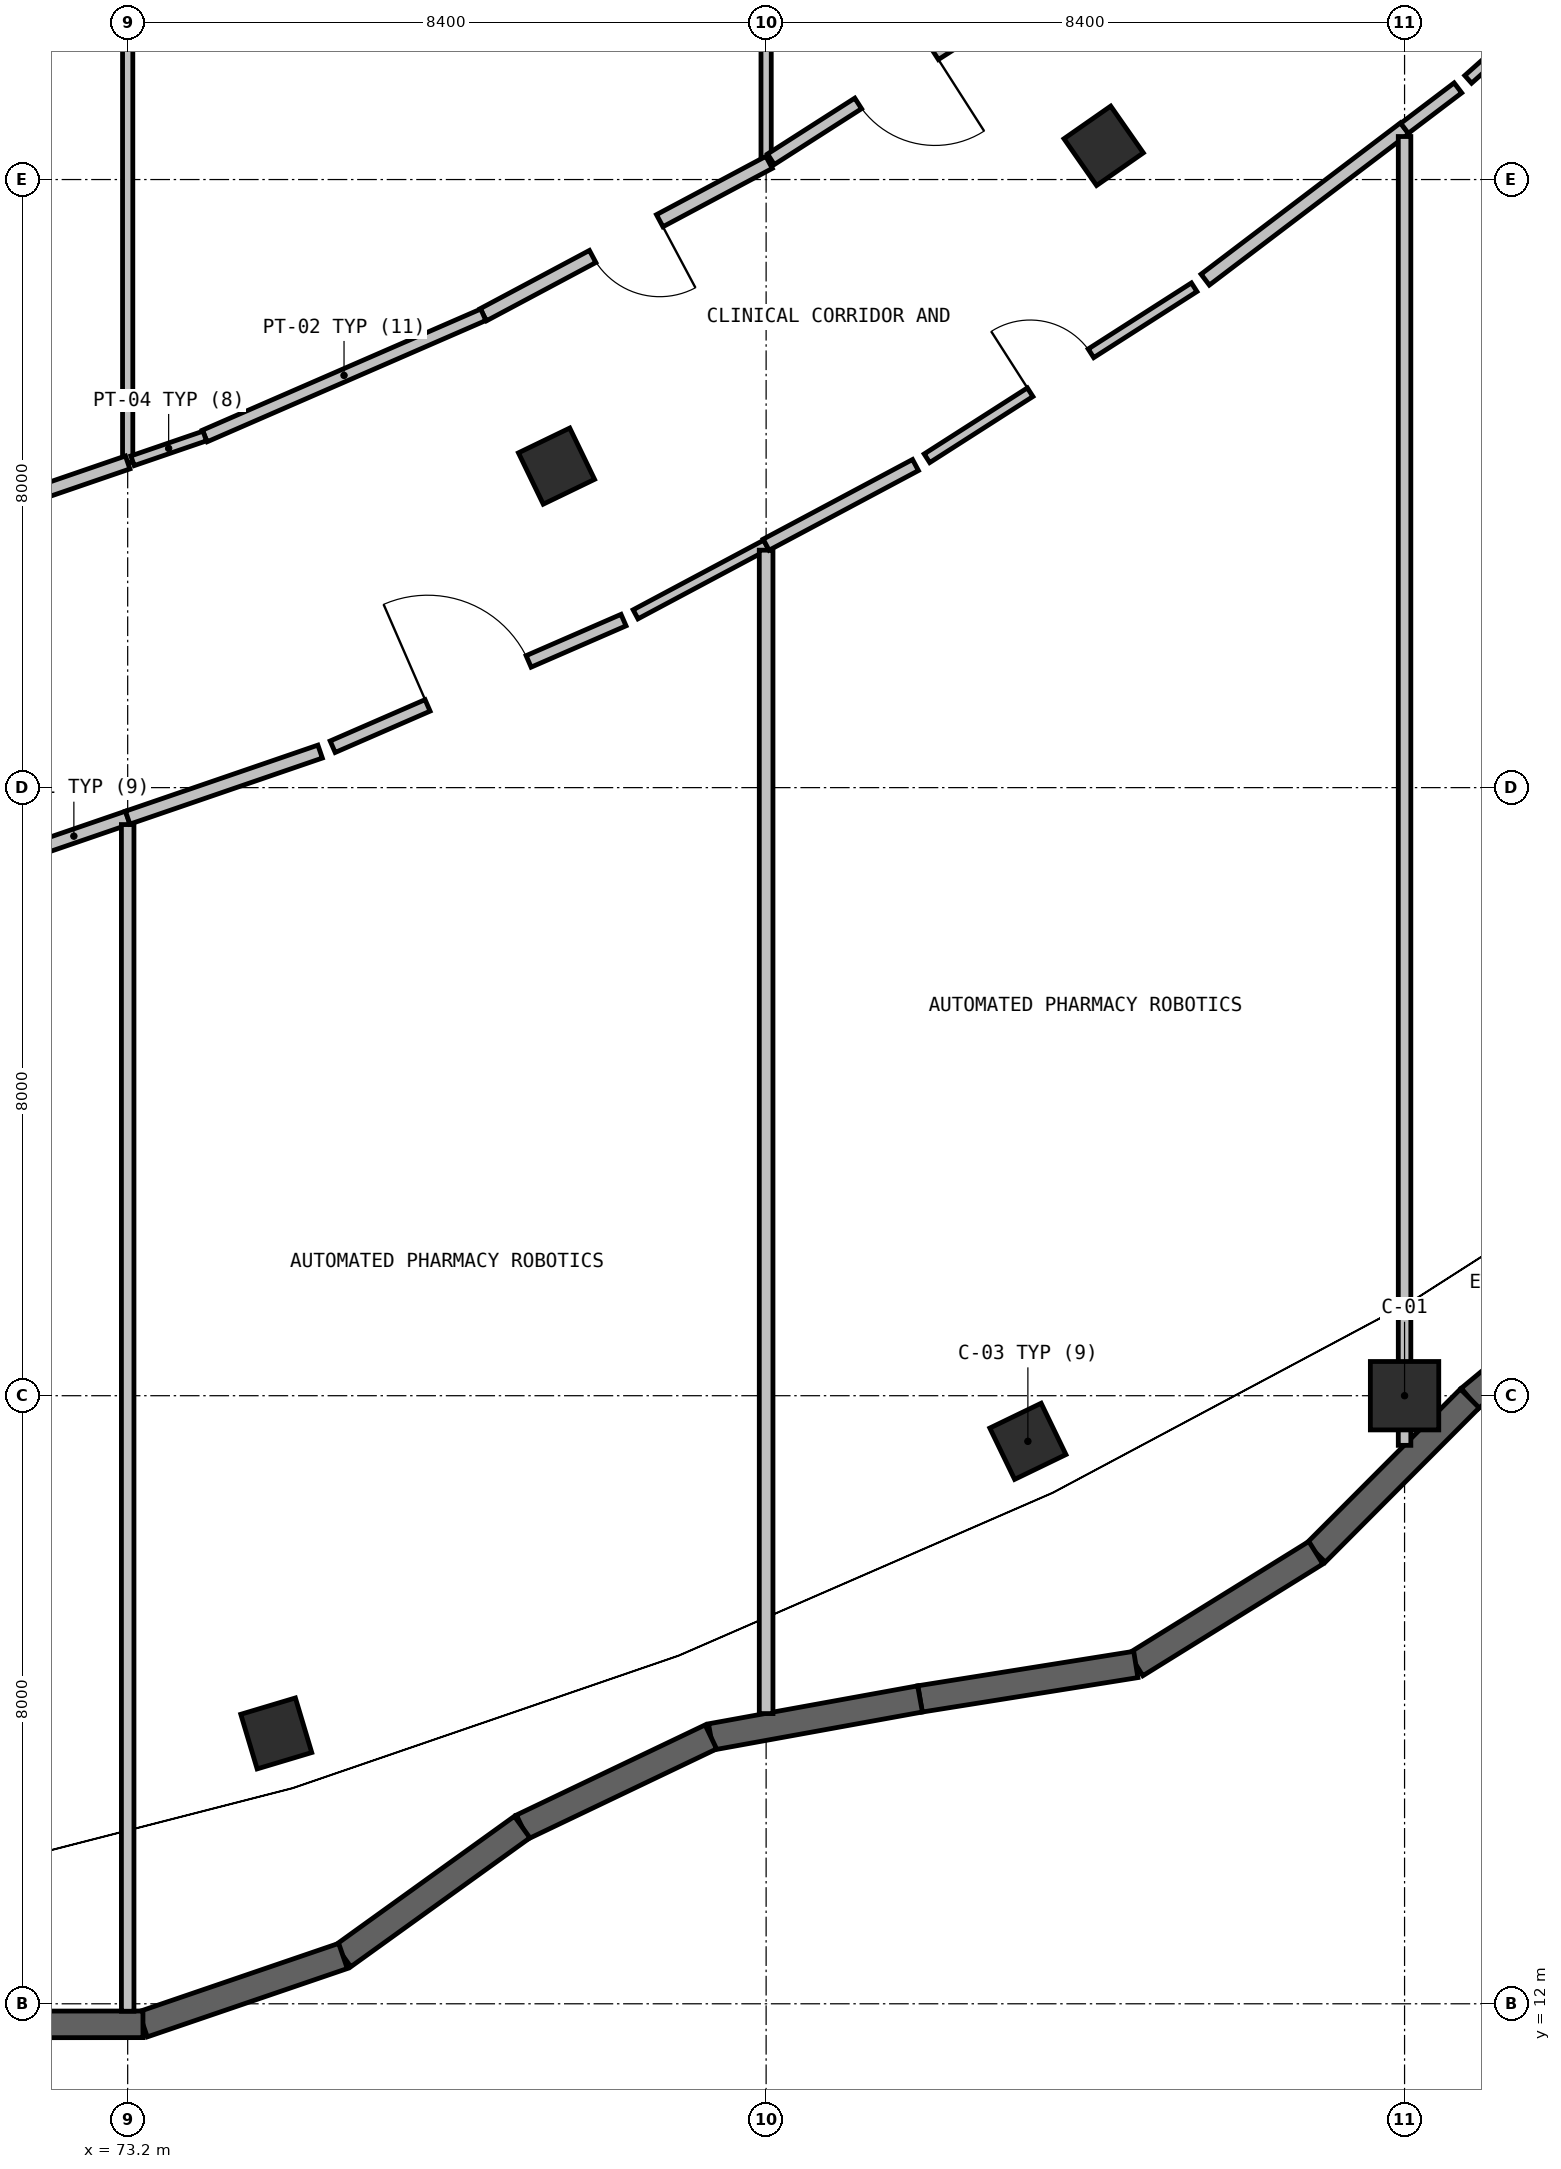
"""IFC4 building model, lengths in metres.
Left out: names, types, materials, properties, quantities, classifications, styles, units other than length and angle.
Written with IfcOpenShell. Run it as: python <this file> out.ifc"""

import sys

from ifc_helpers import new_model, si_unit, direction, frame, frame_2d, origin, origin_2d, place, context, subcontext, project, spatial, rectangle, extrude, element, fill, save


model = new_model("IFC4")
c1 = context("Model", 3, precision=1e-05, world=origin(), true_north=direction((0.0, 1.0)))
c2 = subcontext(c1, "Body", "Model", "MODEL_VIEW")
j1 = project(units=[si_unit("LENGTHUNIT", "METRE"), si_unit("PLANEANGLEUNIT", "RADIAN")], contexts=[c1])
p1 = place(None, origin())
s1 = spatial("IfcSite", under=j1, at=p1, CompositionType="ELEMENT")
p2 = place(p1, origin())
s2 = spatial("IfcBuilding", under=s1, at=p2, CompositionType="ELEMENT")
p3 = place(p2, frame((0.0, 0.0, -4.8)))
s3 = spatial("IfcBuildingStorey", under=s2, at=p3, CompositionType="ELEMENT", Elevation=-4.8)
p4 = place(p3, frame((90.0, 20.0, 0.0), z_axis=(0.0, 0.0, 1.0), x_axis=(1.0, 0.0, 0.0)))
e1 = element("IfcColumn", 1, at=p4, inside=s3, PredefinedType="COLUMN", context=c2, shape_type="SweptSolid", body=[
    extrude(rectangle(XDim=0.9, YDim=0.9, at=origin_2d()), origin(), (0.0, 0.0, 1.0), 4.565),
])
for number, where, z_axis, x_axis in (
    (2, (75.155, 15.557, 0.0), (0.0, 0.0, 1.0), (-0.287, 0.958, 0.0)),
    (3, (78.842, 32.23, 0.0), (0.0, 0.0, 1.0), (-0.435, 0.9, 0.0)),
    (4, (85.044, 19.4, 0.0), (0.0, 0.0, 1.0), (-0.435, 0.9, 0.0)),
    (5, (86.041, 36.444, 0.0), (0.0, 0.0, 1.0), (-0.572, 0.82, 0.0)),
):
    element("IfcColumn", number, at=place(p3, frame(where, z_axis=z_axis, x_axis=x_axis)), inside=s3, PredefinedType="COLUMN", context=c2, shape_type="SweptSolid", body=[
        extrude(rectangle(XDim=0.75, YDim=0.75, at=origin_2d()), origin(), (0.0, 0.0, 1.0), 4.8),
    ])
p5 = place(p3, frame((92.99, 21.736, 0.0), z_axis=(0.0, 0.0, 1.0), x_axis=(-0.76906516177, -0.639170381785, 0.0)))
e6 = element("IfcWall", 6, at=p5, inside=s3, PredefinedType="SHEAR", context=c2, shape_type="SweptSolid", body=[
    extrude(rectangle(XDim=2.772, YDim=0.35, at=frame_2d((1.386, 0.0))), origin(), (0.0, 0.0, 1.0), 4.45),
])
p6 = place(p3, frame((90.858, 19.964, 0.0), z_axis=(0.0, 0.0, 1.0), x_axis=(-0.706212168746, -0.708000263217, 0.0)))
e7 = element("IfcWall", 7, at=p6, inside=s3, PredefinedType="SHEAR", context=c2, shape_type="SweptSolid", body=[
    extrude(rectangle(XDim=2.867, YDim=0.35, at=frame_2d((1.434, 0.0))), origin(), (0.0, 0.0, 1.0), 4.45),
])
p7 = place(p3, frame((88.833, 17.934, 0.0), z_axis=(0.0, 0.0, 1.0), x_axis=(-0.849701046784, -0.527264763752, 0.0)))
e8 = element("IfcWall", 8, at=p7, inside=s3, PredefinedType="SHEAR", context=c2, shape_type="SweptSolid", body=[
    extrude(rectangle(XDim=2.788, YDim=0.35, at=frame_2d((1.394, 0.0))), origin(), (0.0, 0.0, 1.0), 4.45),
])
p8 = place(p3, frame((86.464, 16.464, 0.0), z_axis=(0.0, 0.0, 1.0), x_axis=(-0.9875020261, -0.157606308405, 0.0)))
e9 = element("IfcWall", 9, at=p8, inside=s3, PredefinedType="SHEAR", context=c2, shape_type="SweptSolid", body=[
    extrude(rectangle(XDim=2.875, YDim=0.35, at=frame_2d((1.438, 0.0))), origin(), (0.0, 0.0, 1.0), 4.45),
])
p9 = place(p3, frame((83.625, 16.011, 0.0), z_axis=(0.0, 0.0, 1.0), x_axis=(-0.983892247741, -0.17876253756, 0.0)))
e10 = element("IfcWall", 10, at=p9, inside=s3, PredefinedType="SHEAR", context=c2, shape_type="SweptSolid", body=[
    extrude(rectangle(XDim=2.797, YDim=0.35, at=frame_2d((1.398, 0.0))), origin(), (0.0, 0.0, 1.0), 4.45),
])
p10 = place(p3, frame((80.873, 15.511, 0.0), z_axis=(0.0, 0.0, 1.0), x_axis=(-0.902354807678, -0.430993968705, 0.0)))
e11 = element("IfcWall", 11, at=p10, inside=s3, PredefinedType="SHEAR", context=c2, shape_type="SweptSolid", body=[
    extrude(rectangle(XDim=2.752, YDim=0.35, at=frame_2d((1.376, 0.0))), origin(), (0.0, 0.0, 1.0), 4.45),
])
p11 = place(p3, frame((78.39, 14.325, 0.0), z_axis=(0.0, 0.0, 1.0), x_axis=(-0.811689002355, -0.584089859059, 0.0)))
e12 = element("IfcWall", 12, at=p11, inside=s3, PredefinedType="SHEAR", context=c2, shape_type="SweptSolid", body=[
    extrude(rectangle(XDim=2.904, YDim=0.35, at=frame_2d((1.452, 0.0))), origin(), (0.0, 0.0, 1.0), 4.45),
])
p12 = place(p3, frame((76.033, 12.629, 0.0), z_axis=(0.0, 0.0, 1.0), x_axis=(-0.946331522705, -0.323197538874, 0.0)))
e13 = element("IfcWall", 13, at=p12, inside=s3, PredefinedType="SHEAR", context=c2, shape_type="SweptSolid", body=[
    extrude(rectangle(XDim=2.781, YDim=0.35, at=frame_2d((1.391, 0.0))), origin(), (0.0, 0.0, 1.0), 4.45),
])
p13 = place(p3, frame((73.401, 11.73, 0.0), z_axis=(0.0, 0.0, 1.0), x_axis=(-0.999999763982, -0.000687048962, 0.0)))
e14 = element("IfcWall", 14, at=p13, inside=s3, PredefinedType="SHEAR", context=c2, shape_type="SweptSolid", body=[
    extrude(rectangle(XDim=2.843, YDim=0.35, at=frame_2d((1.421, 0.0))), origin(), (0.0, 0.0, 1.0), 4.45),
])
p14 = place(p3, frame((71.784, 27.119, 0.0), z_axis=(0.0, 0.0, 1.0), x_axis=(0.945824378739, 0.324678678978, 0.0)))
e15 = element("IfcWall", 15, at=p14, inside=s3, PredefinedType="PARTITIONING", context=c2, shape_type="SweptSolid", body=[
    extrude(rectangle(XDim=1.497, YDim=0.18, at=frame_2d((0.749, 0.0))), origin(), (0.0, 0.0, 1.0), 4.45),
])
p15 = place(p3, frame((73.2, 27.514, 0.0), z_axis=(0.0, 0.0, 1.0), x_axis=(0.0, -1.0, 0.0)))
e16 = element("IfcWall", 16, at=p15, inside=s3, PredefinedType="PARTITIONING", context=c2, shape_type="SweptSolid", body=[
    extrude(rectangle(XDim=15.612, YDim=0.165, at=frame_2d((7.806, 0.0))), origin(), (0.0, 0.0, 1.0), 3.75),
])
p16 = place(p3, frame((73.2, 53.74, 0.0), z_axis=(0.0, 0.0, 1.0), x_axis=(0.0, -1.0, 0.0)))
e17 = element("IfcWall", 17, at=p16, inside=s3, PredefinedType="PARTITIONING", context=c2, shape_type="SweptSolid", body=[
    extrude(rectangle(XDim=21.462, YDim=0.135, at=frame_2d((10.731, 0.0))), origin(), (0.0, 0.0, 1.0), 3.7),
])
p17 = place(p3, frame((73.2, 32.278, 0.0), z_axis=(0.0, 0.0, 1.0), x_axis=(-0.94578196559, -0.324802206836, 0.0)))
e18 = element("IfcWall", 18, at=p17, inside=s3, PredefinedType="PARTITIONING", context=c2, shape_type="SweptSolid", body=[
    extrude(rectangle(XDim=2.926, YDim=0.18, at=frame_2d((1.463, 0.0))), origin(), (0.0, 0.0, 1.0), 4.45),
])
p18 = place(p3, frame((73.2, 27.605, 0.0), z_axis=(0.0, 0.0, 1.0), x_axis=(0.945827570445, 0.324669381042, 0.0)))
e19 = element("IfcWall", 19, at=p18, inside=s3, PredefinedType="PARTITIONING", context=c2, shape_type="SweptSolid", body=[
    extrude(rectangle(XDim=2.677, YDim=0.18, at=frame_2d((1.338, 0.0))), origin(), (0.0, 0.0, 1.0), 4.45),
])
p19 = place(p3, frame((75.897, 28.538, 0.0), z_axis=(0.0, 0.0, 1.0), x_axis=(0.916891425258, 0.399136711276, 0.0)))
e20 = element("IfcWall", 20, at=p19, inside=s3, PredefinedType="PARTITIONING", context=c2, shape_type="SweptSolid", body=[
    extrude(rectangle(XDim=4.174, YDim=0.165, at=frame_2d((2.087, 0.0))), origin(), (0.0, 0.0, 1.0), 4.45),
])
p20 = place(p19, frame((1.362, 0.0, 0.0)))
e21 = element("IfcOpeningElement", 21, at=p20, cuts=e20, PredefinedType="OPENING", context=c2, shape_type="SweptSolid", body=[
    extrude(rectangle(XDim=1.45, YDim=2.15, at=frame_2d((0.725, 1.075))), frame((0.0, 0.093, 0.0), z_axis=(0.0, -1.0, 0.0), x_axis=(1.0, 0.0, 0.0)), (0.0, 0.0, 1.0), 0.185),
])
p21 = place(p3, frame((79.882, 30.28, 0.0), z_axis=(0.0, 0.0, 1.0), x_axis=(0.882408473544, 0.470484097305, 0.0)))
e22 = element("IfcWall", 22, at=p21, inside=s3, PredefinedType="PARTITIONING", context=c2, shape_type="SweptSolid", body=[
    extrude(rectangle(XDim=1.947, YDim=0.135, at=frame_2d((0.974, 0.0))), origin(), (0.0, 0.0, 1.0), 4.45),
])
p22 = place(p3, frame((81.6, 31.124, 0.0), z_axis=(0.0, 0.0, 1.0), x_axis=(0.0, -1.0, 0.0)))
e23 = element("IfcWall", 23, at=p22, inside=s3, PredefinedType="PARTITIONING", context=c2, shape_type="SweptSolid", body=[
    extrude(rectangle(XDim=15.306, YDim=0.18, at=frame_2d((7.653, 0.0))), origin(), (0.0, 0.0, 1.0), 4.45),
])
p23 = place(p3, frame((81.6, 52.654, 0.0), z_axis=(0.0, 0.0, 1.0), x_axis=(0.0, -1.0, 0.0)))
e24 = element("IfcWall", 24, at=p23, inside=s3, PredefinedType="PARTITIONING", context=c2, shape_type="SweptSolid", body=[
    extrude(rectangle(XDim=16.428, YDim=0.135, at=frame_2d((8.214, 0.0))), origin(), (0.0, 0.0, 1.0), 4.45),
])
p24 = place(p3, frame((81.639, 36.226, 0.0), z_axis=(0.0, 0.0, 1.0), x_axis=(-0.882373557975, -0.470549576758, 0.0)))
e25 = element("IfcWall", 25, at=p24, inside=s3, PredefinedType="PARTITIONING", context=c2, shape_type="SweptSolid", body=[
    extrude(rectangle(XDim=4.261, YDim=0.18, at=frame_2d((2.131, 0.0))), origin(), (0.0, 0.0, 1.0), 4.45),
])
p25 = place(p24, frame((1.631, 0.0, 0.0)))
e26 = element("IfcOpeningElement", 26, at=p25, cuts=e25, PredefinedType="OPENING", context=c2, shape_type="SweptSolid", body=[
    extrude(rectangle(XDim=1.0, YDim=2.15, at=frame_2d((0.5, 1.075))), frame((0.0, 0.1, 0.0), z_axis=(0.0, -1.0, 0.0), x_axis=(1.0, 0.0, 0.0)), (0.0, 0.0, 1.0), 0.2),
])
p26 = place(p3, frame((77.879, 34.221, 0.0), z_axis=(0.0, 0.0, 1.0), x_axis=(-0.916925298724, -0.399058888586, 0.0)))
e27 = element("IfcWall", 27, at=p26, inside=s3, PredefinedType="PARTITIONING", context=c2, shape_type="SweptSolid", body=[
    extrude(rectangle(XDim=3.997, YDim=0.165, at=frame_2d((1.999, 0.0))), origin(), (0.0, 0.0, 1.0), 4.45),
])
p27 = place(p3, frame((74.214, 32.626, 0.0), z_axis=(0.0, 0.0, 1.0), x_axis=(-0.945901199619, -0.324454805111, 0.0)))
e28 = element("IfcWall", 28, at=p27, inside=s3, PredefinedType="PARTITIONING", context=c2, shape_type="SweptSolid", body=[
    extrude(rectangle(XDim=1.005, YDim=0.135, at=frame_2d((0.502, 0.0))), origin(), (0.0, 0.0, 1.0), 4.45),
])
p28 = place(p3, frame((81.6, 31.196, 0.0), z_axis=(0.0, 0.0, 1.0), x_axis=(0.882365080709, 0.470565472963, 0.0)))
e29 = element("IfcWall", 29, at=p28, inside=s3, PredefinedType="PARTITIONING", context=c2, shape_type="SweptSolid", body=[
    extrude(rectangle(XDim=2.227, YDim=0.165, at=frame_2d((1.113, 0.0))), origin(), (0.0, 0.0, 1.0), 4.45),
])
p29 = place(p3, frame((83.716, 32.333, 0.0), z_axis=(0.0, 0.0, 1.0), x_axis=(0.842288395676, 0.539027140792, 0.0)))
e30 = element("IfcWall", 30, at=p29, inside=s3, PredefinedType="PARTITIONING", context=c2, shape_type="SweptSolid", body=[
    extrude(rectangle(XDim=4.174, YDim=0.135, at=frame_2d((2.087, 0.0))), origin(), (0.0, 0.0, 1.0), 4.45),
])
p30 = place(p29, frame((1.612, 0.0, 0.0)))
e31 = element("IfcOpeningElement", 31, at=p30, cuts=e30, PredefinedType="OPENING", context=c2, shape_type="SweptSolid", body=[
    extrude(rectangle(XDim=0.95, YDim=2.1, at=frame_2d((0.475, 1.05))), frame((0.0, 0.077, 0.0), z_axis=(0.0, -1.0, 0.0), x_axis=(1.0, 0.0, 0.0)), (0.0, 0.0, 1.0), 0.155),
])
p31 = place(p3, frame((87.377, 34.683, 0.0), z_axis=(0.0, 0.0, 1.0), x_axis=(0.796534911727, 0.604592535846, 0.0)))
e32 = element("IfcWall", 32, at=p31, inside=s3, PredefinedType="PARTITIONING", context=c2, shape_type="SweptSolid", body=[
    extrude(rectangle(XDim=3.293, YDim=0.18, at=frame_2d((1.646, 0.0))), origin(), (0.0, 0.0, 1.0), 4.45),
])
p32 = place(p3, frame((90.0, 36.566, 0.0), z_axis=(0.0, 0.0, 1.0), x_axis=(0.0, -1.0, 0.0)))
e33 = element("IfcWall", 33, at=p32, inside=s3, PredefinedType="PARTITIONING", context=c2, shape_type="SweptSolid", body=[
    extrude(rectangle(XDim=17.219, YDim=0.165, at=frame_2d((8.609, 0.0))), origin(), (0.0, 0.0, 1.0), 4.45),
])
p33 = place(p3, frame((84.97, 38.383, 0.0), z_axis=(0.0, 0.0, 1.0), x_axis=(-0.842322219396, -0.538974283906, 0.0)))
e34 = element("IfcWall", 34, at=p33, inside=s3, PredefinedType="PARTITIONING", context=c2, shape_type="SweptSolid", body=[
    extrude(rectangle(XDim=3.926, YDim=0.165, at=frame_2d((1.963, 0.0))), origin(), (0.0, 0.0, 1.0), 4.45),
])
p34 = place(p33, frame((1.363, 0.0, 0.0)))
e35 = element("IfcOpeningElement", 35, at=p34, cuts=e34, PredefinedType="OPENING", context=c2, shape_type="SweptSolid", body=[
    extrude(rectangle(XDim=1.2, YDim=2.15, at=frame_2d((0.6, 1.075))), frame((0.0, 0.093, 0.0), z_axis=(0.0, -1.0, 0.0), x_axis=(1.0, 0.0, 0.0)), (0.0, 0.0, 1.0), 0.185),
])
p35 = place(p3, frame((90.0, 36.674, 0.0), z_axis=(0.0, 0.0, 1.0), x_axis=(0.796962746225, 0.60402846053, 0.0)))
e36 = element("IfcWall", 36, at=p35, inside=s3, PredefinedType="PARTITIONING", context=c2, shape_type="SweptSolid", body=[
    extrude(rectangle(XDim=0.881, YDim=0.165, at=frame_2d((0.44, 0.0))), origin(), (0.0, 0.0, 1.0), 4.45),
])
p36 = place(p3, frame((90.837, 37.318, 0.0), z_axis=(0.0, 0.0, 1.0), x_axis=(0.746227117169, 0.66569143723, 0.0)))
e37 = element("IfcWall", 37, at=p36, inside=s3, PredefinedType="PARTITIONING", context=c2, shape_type="SweptSolid", body=[
    extrude(rectangle(XDim=4.174, YDim=0.135, at=frame_2d((2.087, 0.0))), origin(), (0.0, 0.0, 1.0), 4.45),
])
p37 = place(p36, frame((1.387, 0.0, 0.0)))
e38 = element("IfcOpeningElement", 38, at=p37, cuts=e37, PredefinedType="OPENING", context=c2, shape_type="SweptSolid", body=[
    extrude(rectangle(XDim=1.4, YDim=2.15, at=frame_2d((0.7, 1.075))), frame((0.0, 0.077, 0.0), z_axis=(0.0, -1.0, 0.0), x_axis=(1.0, 0.0, 0.0)), (0.0, 0.0, 1.0), 0.155),
])
p38 = place(p20, origin())
e39 = element("IfcDoor", 39, at=p38, inside=s3, OperationType="SINGLE_SWING_LEFT", PredefinedType="DOOR", context=c2, shape_type="SweptSolid", body=[
    extrude(rectangle(XDim=1.45, YDim=2.15, at=frame_2d((0.725, 1.075))), frame((0.0, 0.025, 0.0), z_axis=(0.0, -1.0, 0.0), x_axis=(1.0, 0.0, 0.0)), (0.0, 0.0, 1.0), 0.05),
])
fill(e21, e39)
p39 = place(p25, origin())
e40 = element("IfcDoor", 40, at=p39, inside=s3, OperationType="SINGLE_SWING_RIGHT", PredefinedType="DOOR", context=c2, shape_type="SweptSolid", body=[
    extrude(rectangle(XDim=1.0, YDim=2.15, at=frame_2d((0.5, 1.075))), frame((0.0, 0.025, 0.0), z_axis=(0.0, -1.0, 0.0), x_axis=(1.0, 0.0, 0.0)), (0.0, 0.0, 1.0), 0.05),
])
fill(e26, e40)
p40 = place(p30, origin())
e41 = element("IfcDoor", 41, at=p40, inside=s3, OperationType="SINGLE_SWING_RIGHT", PredefinedType="DOOR", context=c2, shape_type="SweptSolid", body=[
    extrude(rectangle(XDim=0.95, YDim=2.1, at=frame_2d((0.475, 1.05))), frame((0.0, 0.025, 0.0), z_axis=(0.0, -1.0, 0.0), x_axis=(1.0, 0.0, 0.0)), (0.0, 0.0, 1.0), 0.05),
])
fill(e31, e41)
p41 = place(p34, origin())
e42 = element("IfcDoor", 42, at=p41, inside=s3, OperationType="SINGLE_SWING_LEFT", PredefinedType="DOOR", context=c2, shape_type="SweptSolid", body=[
    extrude(rectangle(XDim=1.2, YDim=2.15, at=frame_2d((0.6, 1.075))), frame((0.0, 0.025, 0.0), z_axis=(0.0, -1.0, 0.0), x_axis=(1.0, 0.0, 0.0)), (0.0, 0.0, 1.0), 0.05),
])
fill(e35, e42)
save(model, sys.argv[1])
